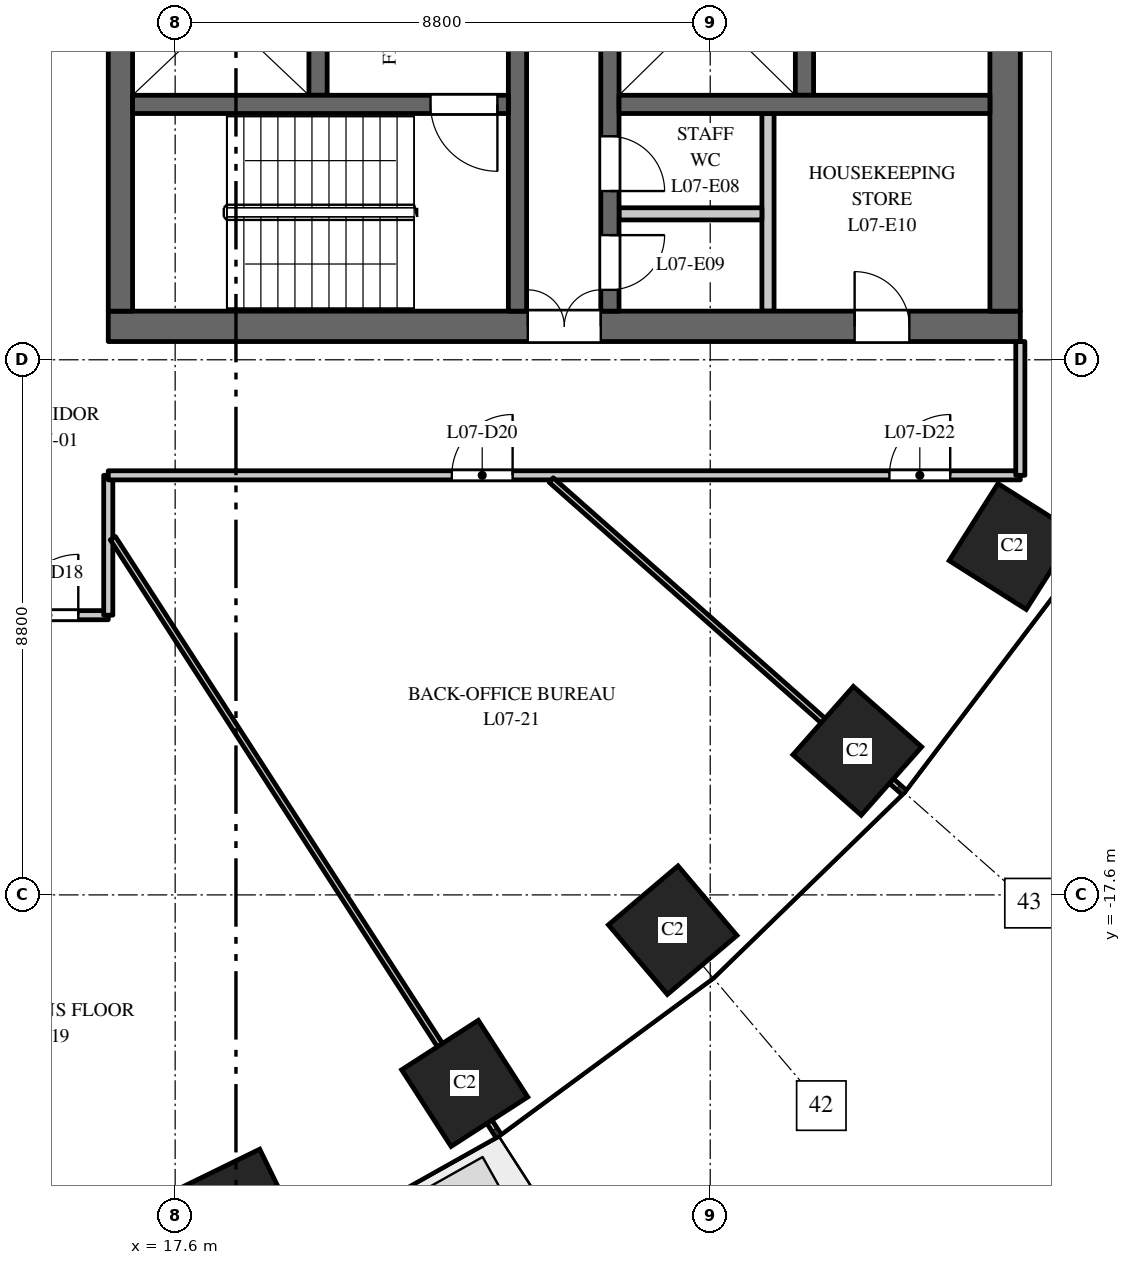
"""IFC4 building model, lengths in metres.
Left out: names, types, materials, properties, quantities, classifications, styles, units other than length and angle.
Written with IfcOpenShell. Run it as: python <this file> out.ifc"""

import sys

from ifc_helpers import new_model, si_unit, direction, frame, frame_2d, origin, origin_2d, place, context, subcontext, project, spatial, rectangle, extrude, element, fill, save


model = new_model("IFC4")
c1 = context("Model", 3, precision=1e-05, world=origin(), true_north=direction((0.0, 1.0)))
c2 = subcontext(c1, "Body", "Model", "MODEL_VIEW")
j1 = project(units=[si_unit("LENGTHUNIT", "METRE"), si_unit("PLANEANGLEUNIT", "RADIAN")], contexts=[c1])
p1 = place(None, origin())
s1 = spatial("IfcSite", under=j1, at=p1, CompositionType="ELEMENT")
p2 = place(p1, origin())
s2 = spatial("IfcBuilding", under=s1, at=p2, CompositionType="ELEMENT")
p3 = place(p2, frame((0.0, 0.0, 38.5)))
s3 = spatial("IfcBuildingStorey", under=s2, at=p3, CompositionType="ELEMENT", Elevation=38.5)
for number, where, z_axis, x_axis in (
    (1, (18.646, -22.785, 0.0), (0.0, 0.0, 1.0), (0.898, 0.439, 0.0)),
    (2, (22.362, -20.7, 0.0), (0.0, 0.0, 1.0), (0.84, 0.542, 0.0)),
    (3, (25.783, -18.18, 0.0), (0.0, 0.0, 1.0), (0.763, 0.646, 0.0)),
    (4, (28.819, -15.23, 0.0), (0.0, 0.0, 1.0), (0.663, 0.749, 0.0)),
    (5, (31.365, -11.871, 0.0), (0.0, 0.0, 1.0), (0.535, 0.845, 0.0)),
):
    element("IfcColumn", number, at=place(p3, frame(where, z_axis=z_axis, x_axis=x_axis)), inside=s3, PredefinedType="COLUMN", context=c2, shape_type="SweptSolid", body=[
        extrude(rectangle(XDim=1.5, YDim=1.5, at=origin_2d()), origin(), (0.0, 0.0, 1.0), 4.0),
    ])
p4 = place(p3, frame((16.5, -8.25, 0.0), z_axis=(0.0, 0.0, 1.0), x_axis=(1.0, 0.0, 0.0)))
e6 = element("IfcWall", 6, at=p4, inside=s3, PredefinedType="SHEAR", context=c2, shape_type="SweptSolid", body=[
    extrude(rectangle(XDim=15.0, YDim=0.5, at=frame_2d((7.5, 0.0))), origin(), (0.0, 0.0, 1.0), 3.7),
])
p5 = place(p4, frame((6.9, 0.0, 0.0)))
e7 = element("IfcOpeningElement", 7, at=p5, cuts=e6, PredefinedType="OPENING", context=c2, shape_type="SweptSolid", body=[
    extrude(rectangle(XDim=1.2, YDim=2.1, at=frame_2d((0.6, 1.05))), frame((0.0, 0.26, 0.0), z_axis=(0.0, -1.0, 0.0), x_axis=(1.0, 0.0, 0.0)), (0.0, 0.0, 1.0), 0.52),
])
p6 = place(p4, frame((12.275, 0.0, 0.0)))
e8 = element("IfcOpeningElement", 8, at=p6, cuts=e6, PredefinedType="OPENING", context=c2, shape_type="SweptSolid", body=[
    extrude(rectangle(XDim=0.9, YDim=2.1, at=frame_2d((0.45, 1.05))), frame((0.0, 0.26, 0.0), z_axis=(0.0, -1.0, 0.0), x_axis=(1.0, 0.0, 0.0)), (0.0, 0.0, 1.0), 0.52),
])
p7 = place(p3, frame((27.95, -4.45, 0.0), z_axis=(0.0, 0.0, 1.0), x_axis=(0.0, 1.0, 0.0)))
e9 = element("IfcWall", 9, at=p7, inside=s3, PredefinedType="SHEAR", context=c2, shape_type="SweptSolid", body=[
    extrude(rectangle(XDim=8.9, YDim=0.3, at=frame_2d((4.45, 0.0))), origin(), (0.0, 0.0, 1.0), 3.7),
])
p8 = place(p3, frame((19.95, -4.45, 0.0), z_axis=(0.0, 0.0, 1.0), x_axis=(0.0, 1.0, 0.0)))
e10 = element("IfcWall", 10, at=p8, inside=s3, PredefinedType="SHEAR", context=c2, shape_type="SweptSolid", body=[
    extrude(rectangle(XDim=8.9, YDim=0.3, at=frame_2d((4.45, 0.0))), origin(), (0.0, 0.0, 1.0), 3.7),
])
p9 = place(p8, frame((0.775, 0.0, 0.0)))
e11 = element("IfcOpeningElement", 11, at=p9, cuts=e10, PredefinedType="OPENING", context=c2, shape_type="SweptSolid", body=[
    extrude(rectangle(XDim=1.2, YDim=2.1, at=frame_2d((0.6, 1.05))), frame((0.0, 0.16, 0.0), z_axis=(0.0, -1.0, 0.0), x_axis=(1.0, 0.0, 0.0)), (0.0, 0.0, 1.0), 0.32),
])
p10 = place(p8, frame((4.788, 0.0, 0.0)))
e12 = element("IfcOpeningElement", 12, at=p10, cuts=e10, PredefinedType="OPENING", context=c2, shape_type="SweptSolid", body=[
    extrude(rectangle(XDim=0.9, YDim=2.1, at=frame_2d((0.45, 1.05))), frame((0.0, 0.16, 0.0), z_axis=(0.0, -1.0, 0.0), x_axis=(1.0, 0.0, 0.0)), (0.0, 0.0, 1.0), 0.32),
])
p11 = place(p8, frame((7.337, 0.0, 0.0)))
e13 = element("IfcOpeningElement", 13, at=p11, cuts=e10, PredefinedType="OPENING", context=c2, shape_type="SweptSolid", body=[
    extrude(rectangle(XDim=0.9, YDim=2.1, at=frame_2d((0.45, 1.05))), frame((0.0, 0.16, 0.0), z_axis=(0.0, -1.0, 0.0), x_axis=(1.0, 0.0, 0.0)), (0.0, 0.0, 1.0), 0.32),
])
p12 = place(p3, frame((24.75, -8.0, 0.0), z_axis=(0.0, 0.0, 1.0), x_axis=(0.0, 1.0, 0.0)))
e14 = element("IfcWall", 14, at=p12, inside=s3, PredefinedType="SHEAR", context=c2, shape_type="SweptSolid", body=[
    extrude(rectangle(XDim=16.0, YDim=0.3, at=frame_2d((8.0, 0.0))), origin(), (0.0, 0.0, 1.0), 3.7),
])
p13 = place(p12, frame((4.425, 0.0, 0.0)))
e15 = element("IfcOpeningElement", 15, at=p13, cuts=e14, PredefinedType="OPENING", context=c2, shape_type="SweptSolid", body=[
    extrude(rectangle(XDim=1.1, YDim=2.1, at=frame_2d((0.55, 1.05))), frame((0.0, 0.16, 0.0), z_axis=(0.0, -1.0, 0.0), x_axis=(1.0, 0.0, 0.0)), (0.0, 0.0, 1.0), 0.32),
])
p14 = place(p12, frame((7.45, 0.0, 0.0)))
e16 = element("IfcOpeningElement", 16, at=p14, cuts=e14, PredefinedType="OPENING", context=c2, shape_type="SweptSolid", body=[
    extrude(rectangle(XDim=1.1, YDim=2.1, at=frame_2d((0.55, 1.05))), frame((0.0, 0.16, 0.0), z_axis=(0.0, -1.0, 0.0), x_axis=(1.0, 0.0, 0.0)), (0.0, 0.0, 1.0), 0.32),
])
p15 = place(p12, frame((10.425, 0.0, 0.0)))
e17 = element("IfcOpeningElement", 17, at=p15, cuts=e14, PredefinedType="OPENING", context=c2, shape_type="SweptSolid", body=[
    extrude(rectangle(XDim=1.2, YDim=2.1, at=frame_2d((0.6, 1.05))), frame((0.0, 0.16, 0.0), z_axis=(0.0, -1.0, 0.0), x_axis=(1.0, 0.0, 0.0)), (0.0, 0.0, 1.0), 0.32),
])
p16 = place(p12, frame((13.75, 0.0, 0.0)))
e18 = element("IfcOpeningElement", 18, at=p16, cuts=e14, PredefinedType="OPENING", context=c2, shape_type="SweptSolid", body=[
    extrude(rectangle(XDim=0.9, YDim=2.1, at=frame_2d((0.45, 1.05))), frame((0.0, 0.16, 0.0), z_axis=(0.0, -1.0, 0.0), x_axis=(1.0, 0.0, 0.0)), (0.0, 0.0, 1.0), 0.32),
])
p17 = place(p12, frame((1.975, 0.0, 0.0)))
e19 = element("IfcOpeningElement", 19, at=p17, cuts=e14, PredefinedType="OPENING", context=c2, shape_type="SweptSolid", body=[
    extrude(rectangle(XDim=0.9, YDim=2.1, at=frame_2d((0.45, 1.05))), frame((0.0, 0.16, 0.0), z_axis=(0.0, -1.0, 0.0), x_axis=(1.0, 0.0, 0.0)), (0.0, 0.0, 1.0), 0.32),
])
p18 = place(p12, frame((0.35, 0.0, 0.0)))
e20 = element("IfcOpeningElement", 20, at=p18, cuts=e14, PredefinedType="OPENING", context=c2, shape_type="SweptSolid", body=[
    extrude(rectangle(XDim=0.9, YDim=2.1, at=frame_2d((0.45, 1.05))), frame((0.0, 0.16, 0.0), z_axis=(0.0, -1.0, 0.0), x_axis=(1.0, 0.0, 0.0)), (0.0, 0.0, 1.0), 0.32),
])
p19 = place(p3, frame((16.7, -8.0, 0.0), z_axis=(0.0, 0.0, 1.0), x_axis=(0.0, 1.0, 0.0)))
e21 = element("IfcWall", 21, at=p19, inside=s3, PredefinedType="SHEAR", context=c2, shape_type="SweptSolid", body=[
    extrude(rectangle(XDim=16.0, YDim=0.4, at=frame_2d((8.0, 0.0))), origin(), (0.0, 0.0, 1.0), 3.7),
])
p20 = place(p3, frame((31.25, -8.0, 0.0), z_axis=(0.0, 0.0, 1.0), x_axis=(0.0, 1.0, 0.0)))
e22 = element("IfcWall", 22, at=p20, inside=s3, PredefinedType="SHEAR", context=c2, shape_type="SweptSolid", body=[
    extrude(rectangle(XDim=16.0, YDim=0.5, at=frame_2d((8.0, 0.0))), origin(), (0.0, 0.0, 1.0), 3.7),
])
p21 = place(p3, frame((27.35, -8.0, 0.0), z_axis=(0.0, 0.0, 1.0), x_axis=(0.0, 1.0, 0.0)))
e23 = element("IfcWall", 23, at=p21, inside=s3, PredefinedType="PARTITIONING", context=c2, shape_type="SweptSolid", body=[
    extrude(rectangle(XDim=3.25, YDim=0.2, at=frame_2d((1.625, 0.0))), origin(), (0.0, 0.0, 1.0), 3.7),
])
p22 = place(p3, frame((24.9, -6.4, 0.0), z_axis=(0.0, 0.0, 1.0), x_axis=(1.0, 0.0, 0.0)))
e24 = element("IfcWall", 24, at=p22, inside=s3, PredefinedType="PARTITIONING", context=c2, shape_type="SweptSolid", body=[
    extrude(rectangle(XDim=2.35, YDim=0.2, at=frame_2d((1.175, 0.0))), origin(), (0.0, 0.0, 1.0), 3.7),
])
p23 = place(p3, frame((24.9, -4.6, 0.0), z_axis=(0.0, 0.0, 1.0), x_axis=(1.0, 0.0, 0.0)))
e25 = element("IfcWall", 25, at=p23, inside=s3, PredefinedType="SHEAR", context=c2, shape_type="SweptSolid", body=[
    extrude(rectangle(XDim=6.1, YDim=0.3, at=frame_2d((3.05, 0.0))), origin(), (0.0, 0.0, 1.0), 3.7),
])
p24 = place(p3, frame((23.23, -8.0, 0.0), z_axis=(0.0, 0.0, 1.0), x_axis=(0.0, 1.0, 0.0)))
e26 = element("IfcWall", 26, at=p24, inside=s3, PredefinedType="SHEAR", context=c2, shape_type="SweptSolid", body=[
    extrude(rectangle(XDim=7.875, YDim=0.3, at=frame_2d((3.938, 0.0))), origin(), (0.0, 0.0, 1.0), 3.7),
])
p25 = place(p24, frame((5.15, 0.0, 0.0)))
e27 = element("IfcOpeningElement", 27, at=p25, cuts=e26, PredefinedType="OPENING", context=c2, shape_type="SweptSolid", body=[
    extrude(rectangle(XDim=1.1, YDim=2.1, at=frame_2d((0.55, 1.05))), frame((0.0, 0.16, 0.0), z_axis=(0.0, -1.0, 0.0), x_axis=(1.0, 0.0, 0.0)), (0.0, 0.0, 1.0), 0.32),
])
p26 = place(p3, frame((16.9, -4.6, 0.0), z_axis=(0.0, 0.0, 1.0), x_axis=(1.0, 0.0, 0.0)))
e28 = element("IfcWall", 28, at=p26, inside=s3, PredefinedType="SHEAR", context=c2, shape_type="SweptSolid", body=[
    extrude(rectangle(XDim=6.18, YDim=0.3, at=frame_2d((3.09, 0.0))), origin(), (0.0, 0.0, 1.0), 3.7),
])
p27 = place(p26, frame((4.9, 0.0, 0.0)))
e29 = element("IfcOpeningElement", 29, at=p27, cuts=e28, PredefinedType="OPENING", context=c2, shape_type="SweptSolid", body=[
    extrude(rectangle(XDim=1.1, YDim=2.1, at=frame_2d((0.55, 1.05))), frame((0.0, 0.16, 0.0), z_axis=(0.0, -1.0, 0.0), x_axis=(1.0, 0.0, 0.0)), (0.0, 0.0, 1.0), 0.32),
])
p28 = place(p3, frame((10.607, -13.0, 0.0), z_axis=(0.0, 0.0, 1.0), x_axis=(1.0, 0.0, 0.0)))
e30 = element("IfcWall", 30, at=p28, inside=s3, PredefinedType="PARTITIONING", context=c2, shape_type="SweptSolid", body=[
    extrude(rectangle(XDim=5.893, YDim=0.15, at=frame_2d((2.947, 0.0))), origin(), (0.0, 0.0, 1.0), 3.7),
])
p29 = place(p28, frame((4.4, 0.0, 0.0)))
e31 = element("IfcOpeningElement", 31, at=p29, cuts=e30, PredefinedType="OPENING", context=c2, shape_type="SweptSolid", body=[
    extrude(rectangle(XDim=1.0, YDim=2.1, at=frame_2d((0.5, 1.05))), frame((0.0, 0.085, 0.0), z_axis=(0.0, -1.0, 0.0), x_axis=(1.0, 0.0, 0.0)), (0.0, 0.0, 1.0), 0.17),
])
p30 = place(p3, frame((16.5, -13.0, 0.0), z_axis=(0.0, 0.0, 1.0), x_axis=(0.0, 1.0, 0.0)))
e32 = element("IfcWall", 32, at=p30, inside=s3, PredefinedType="PARTITIONING", context=c2, shape_type="SweptSolid", body=[
    extrude(rectangle(XDim=2.3, YDim=0.15, at=frame_2d((1.15, 0.0))), origin(), (0.0, 0.0, 1.0), 3.7),
])
p31 = place(p3, frame((16.575, -11.733, 0.0), z_axis=(0.0, 0.0, 1.0), x_axis=(0.54222594427, -0.840232720953, 0.0)))
e33 = element("IfcWall", 33, at=p31, inside=s3, PredefinedType="PARTITIONING", context=c2, shape_type="SweptSolid", body=[
    extrude(rectangle(XDim=11.674, YDim=0.1, at=frame_2d((5.837, 0.0))), origin(), (0.0, 0.0, 1.0), 3.7),
])
p32 = place(p3, frame((16.5, -10.7, 0.0), z_axis=(0.0, 0.0, 1.0), x_axis=(1.0, 0.0, 0.0)))
e34 = element("IfcWall", 34, at=p32, inside=s3, PredefinedType="PARTITIONING", context=c2, shape_type="SweptSolid", body=[
    extrude(rectangle(XDim=15.0, YDim=0.15, at=frame_2d((7.5, 0.0))), origin(), (0.0, 0.0, 1.0), 2.75),
])
p33 = place(p32, frame((5.65, 0.0, 0.0)))
e35 = element("IfcOpeningElement", 35, at=p33, cuts=e34, PredefinedType="OPENING", context=c2, shape_type="SweptSolid", body=[
    extrude(rectangle(XDim=1.0, YDim=2.1, at=frame_2d((0.5, 1.05))), frame((0.0, 0.085, 0.0), z_axis=(0.0, -1.0, 0.0), x_axis=(1.0, 0.0, 0.0)), (0.0, 0.0, 1.0), 0.17),
])
p34 = place(p32, frame((12.847, 0.0, 0.0)))
e36 = element("IfcOpeningElement", 36, at=p34, cuts=e34, PredefinedType="OPENING", context=c2, shape_type="SweptSolid", body=[
    extrude(rectangle(XDim=1.0, YDim=2.1, at=frame_2d((0.5, 1.05))), frame((0.0, 0.085, 0.0), z_axis=(0.0, -1.0, 0.0), x_axis=(1.0, 0.0, 0.0)), (0.0, 0.0, 1.0), 0.17),
])
p35 = place(p3, frame((23.785, -10.778, 0.0), z_axis=(0.0, 0.0, 1.0), x_axis=(0.748985701008, -0.662586160198, 0.0)))
e37 = element("IfcWall", 37, at=p35, inside=s3, PredefinedType="PARTITIONING", context=c2, shape_type="SweptSolid", body=[
    extrude(rectangle(XDim=7.723, YDim=0.1, at=frame_2d((3.861, 0.0))), origin(), (0.0, 0.0, 1.0), 3.7),
])
p36 = place(p3, frame((31.5, -10.7, 0.0), z_axis=(0.0, 0.0, 1.0), x_axis=(0.0, 1.0, 0.0)))
e38 = element("IfcWall", 38, at=p36, inside=s3, PredefinedType="PARTITIONING", context=c2, shape_type="SweptSolid", body=[
    extrude(rectangle(XDim=2.2, YDim=0.15, at=frame_2d((1.1, 0.0))), origin(), (0.0, 0.0, 1.0), 2.85),
])
p37 = place(p27, origin())
e39 = element("IfcDoor", 39, at=p37, inside=s3, OperationType="SINGLE_SWING_RIGHT", PredefinedType="DOOR", context=c2, shape_type="SweptSolid", body=[
    extrude(rectangle(XDim=1.1, YDim=2.1, at=frame_2d((0.55, 1.05))), frame((0.0, 0.025, 0.0), z_axis=(0.0, -1.0, 0.0), x_axis=(1.0, 0.0, 0.0)), (0.0, 0.0, 1.0), 0.05),
])
fill(e29, e39)
p38 = place(p5, origin())
e40 = element("IfcDoor", 40, at=p38, inside=s3, OperationType="DOUBLE_DOOR_DOUBLE_SWING", PredefinedType="DOOR", context=c2, shape_type="SweptSolid", body=[
    extrude(rectangle(XDim=1.2, YDim=2.1, at=frame_2d((0.6, 1.05))), frame((0.0, 0.025, 0.0), z_axis=(0.0, -1.0, 0.0), x_axis=(1.0, 0.0, 0.0)), (0.0, 0.0, 1.0), 0.05),
])
fill(e7, e40)
p39 = place(p17, origin())
e41 = element("IfcDoor", 41, at=p39, inside=s3, OperationType="SINGLE_SWING_LEFT", PredefinedType="DOOR", context=c2, shape_type="SweptSolid", body=[
    extrude(rectangle(XDim=0.9, YDim=2.1, at=frame_2d((0.45, 1.05))), frame((0.0, 0.025, 0.0), z_axis=(0.0, -1.0, 0.0), x_axis=(1.0, 0.0, 0.0)), (0.0, 0.0, 1.0), 0.05),
])
fill(e19, e41)
p40 = place(p18, origin())
e42 = element("IfcDoor", 42, at=p40, inside=s3, OperationType="SINGLE_SWING_RIGHT", PredefinedType="DOOR", context=c2, shape_type="SweptSolid", body=[
    extrude(rectangle(XDim=0.9, YDim=2.1, at=frame_2d((0.45, 1.05))), frame((0.0, 0.025, 0.0), z_axis=(0.0, -1.0, 0.0), x_axis=(1.0, 0.0, 0.0)), (0.0, 0.0, 1.0), 0.05),
])
fill(e20, e42)
p41 = place(p6, origin())
e43 = element("IfcDoor", 43, at=p41, inside=s3, OperationType="SINGLE_SWING_RIGHT", PredefinedType="DOOR", context=c2, shape_type="SweptSolid", body=[
    extrude(rectangle(XDim=0.9, YDim=2.1, at=frame_2d((0.45, 1.05))), frame((0.0, 0.025, 0.0), z_axis=(0.0, -1.0, 0.0), x_axis=(1.0, 0.0, 0.0)), (0.0, 0.0, 1.0), 0.05),
])
fill(e8, e43)
p42 = place(p29, origin())
e44 = element("IfcDoor", 44, at=p42, inside=s3, OperationType="SINGLE_SWING_RIGHT", PredefinedType="DOOR", context=c2, shape_type="SweptSolid", body=[
    extrude(rectangle(XDim=1.0, YDim=2.1, at=frame_2d((0.5, 1.05))), frame((0.0, 0.025, 0.0), z_axis=(0.0, -1.0, 0.0), x_axis=(1.0, 0.0, 0.0)), (0.0, 0.0, 1.0), 0.05),
])
fill(e31, e44)
p43 = place(p33, origin())
e45 = element("IfcDoor", 45, at=p43, inside=s3, OperationType="SINGLE_SWING_RIGHT", PredefinedType="DOOR", context=c2, shape_type="SweptSolid", body=[
    extrude(rectangle(XDim=1.0, YDim=2.1, at=frame_2d((0.5, 1.05))), frame((0.0, 0.025, 0.0), z_axis=(0.0, -1.0, 0.0), x_axis=(1.0, 0.0, 0.0)), (0.0, 0.0, 1.0), 0.05),
])
fill(e35, e45)
p44 = place(p34, origin())
e46 = element("IfcDoor", 46, at=p44, inside=s3, OperationType="SINGLE_SWING_RIGHT", PredefinedType="DOOR", context=c2, shape_type="SweptSolid", body=[
    extrude(rectangle(XDim=1.0, YDim=2.1, at=frame_2d((0.5, 1.05))), frame((0.0, 0.025, 0.0), z_axis=(0.0, -1.0, 0.0), x_axis=(1.0, 0.0, 0.0)), (0.0, 0.0, 1.0), 0.05),
])
fill(e36, e46)
save(model, sys.argv[1])
